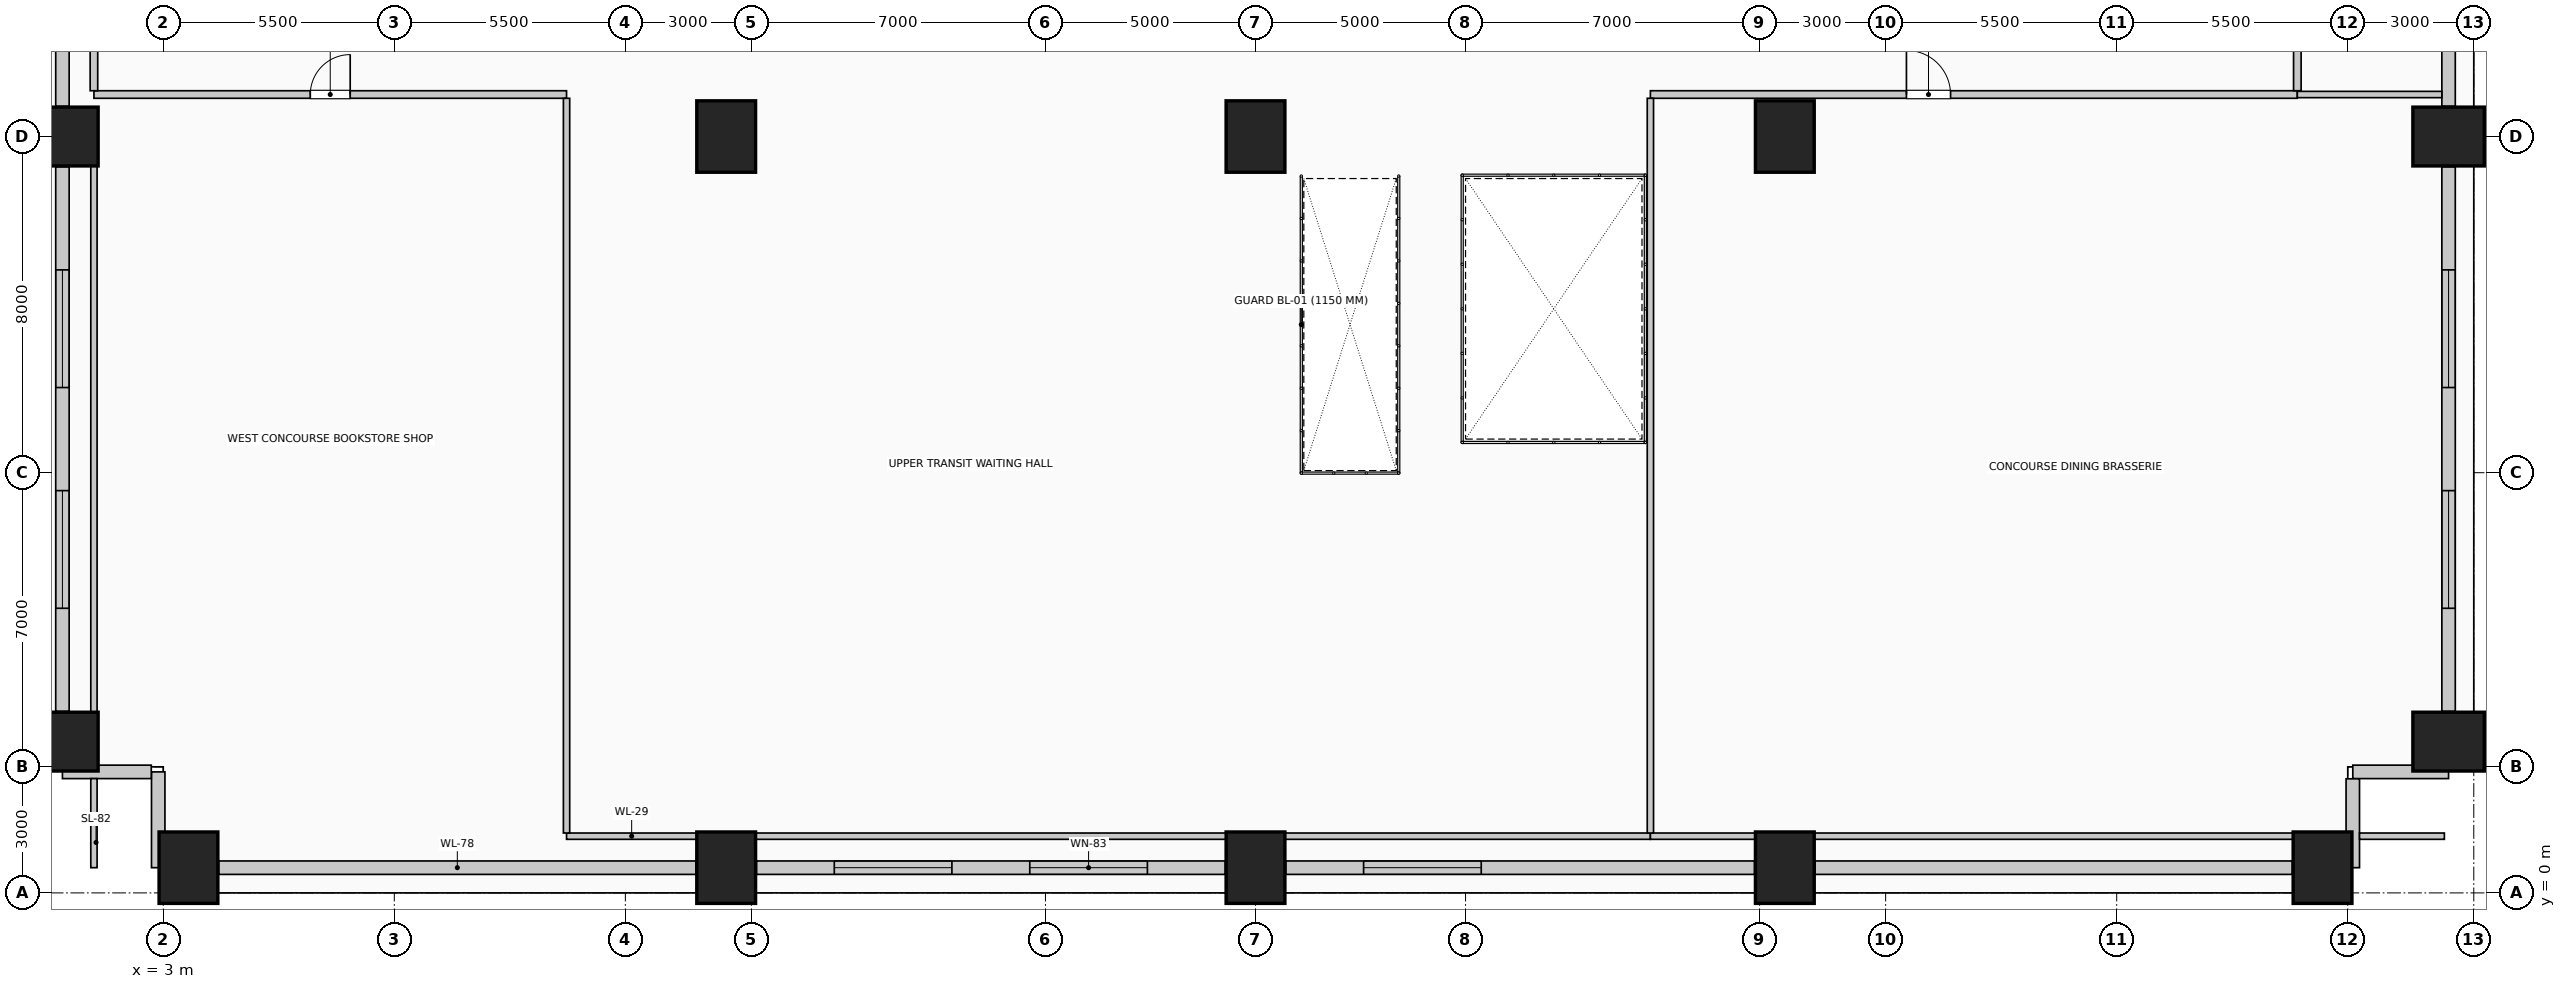
"""IFC4 building model, lengths in metres.
Left out: names, types, materials, properties, quantities, classifications, styles, units other than length and angle.
Written with IfcOpenShell. Run it as: python <this file> out.ifc"""

import sys

from ifc_helpers import new_model, si_unit, direction, frame, frame_2d, origin, origin_2d, place, context, subcontext, project, spatial, rectangle, extrude, element, fill, save


model = new_model("IFC4")
c1 = context("Model", 3, precision=1e-05, world=origin(), true_north=direction((0.0, 1.0)))
c2 = subcontext(c1, "Body", "Model", "MODEL_VIEW")
j1 = project(units=[si_unit("LENGTHUNIT", "METRE"), si_unit("PLANEANGLEUNIT", "RADIAN")], contexts=[c1])
p1 = place(None, origin())
s1 = spatial("IfcSite", under=j1, at=p1, CompositionType="ELEMENT")
p2 = place(p1, origin())
s2 = spatial("IfcBuilding", under=s1, at=p2, CompositionType="ELEMENT")
p3 = place(p2, frame((0.0, 0.0, 13.5)))
s3 = spatial("IfcBuildingStorey", under=s2, at=p3, CompositionType="ELEMENT", Elevation=13.5)
for number, where, z_axis, x_axis in (
    (1, (3.6, 0.6, 0.0), (0.0, 0.0, 1.0), (1.0, 0.0, 0.0)),
    (2, (16.4, 0.6, 0.0), (0.0, 0.0, 1.0), (1.0, 0.0, 0.0)),
    (3, (29.0, 0.6, 0.0), (0.0, 0.0, 1.0), (1.0, 0.0, 0.0)),
    (4, (41.6, 0.6, 0.0), (0.0, 0.0, 1.0), (1.0, 0.0, 0.0)),
    (5, (54.4, 0.6, 0.0), (0.0, 0.0, 1.0), (1.0, 0.0, 0.0)),
    (6, (0.6, 3.6, 0.0), (0.0, 0.0, 1.0), (0.0, 1.0, 0.0)),
    (7, (57.4, 3.6, 0.0), (0.0, 0.0, 1.0), (0.0, 1.0, 0.0)),
    (8, (0.6, 18.0, 0.0), (0.0, 0.0, 1.0), (0.0, 1.0, 0.0)),
    (9, (57.4, 18.0, 0.0), (0.0, 0.0, 1.0), (0.0, 1.0, 0.0)),
    (10, (16.4, 18.0, 0.0), (0.0, 0.0, 1.0), (1.0, 0.0, 0.0)),
    (11, (29.0, 18.0, 0.0), (0.0, 0.0, 1.0), (1.0, 0.0, 0.0)),
    (12, (41.6, 18.0, 0.0), (0.0, 0.0, 1.0), (1.0, 0.0, 0.0)),
):
    element("IfcColumn", number, at=place(p3, frame(where, z_axis=z_axis, x_axis=x_axis)), inside=s3, PredefinedType="COLUMN", context=c2, shape_type="SweptSolid", body=[
        extrude(rectangle(XDim=1.4, YDim=1.7, at=origin_2d()), origin(), (0.0, 0.0, 1.0), 4.05),
    ])
p4 = place(p3, frame((15.68, 0.6, 0.0), z_axis=(0.0, 0.0, 1.0), x_axis=(-1.0, 0.0, 0.0)))
e13 = element("IfcWall", 13, at=p4, inside=s3, PredefinedType="SOLIDWALL", context=c2, shape_type="SweptSolid", body=[
    extrude(rectangle(XDim=11.36, YDim=0.32, at=frame_2d((5.68, 0.0))), origin(), (0.0, 0.0, 1.0), 2.7),
])
p5 = place(p3, frame((28.28, 0.6, 0.0), z_axis=(0.0, 0.0, 1.0), x_axis=(-1.0, 0.0, 0.0)))
e14 = element("IfcWall", 14, at=p5, inside=s3, PredefinedType="SOLIDWALL", context=c2, shape_type="SweptSolid", body=[
    extrude(rectangle(XDim=11.16, YDim=0.32, at=frame_2d((5.58, 0.0))), origin(), (0.0, 0.0, 1.0), 2.7),
])
p6 = place(p5, frame((1.853, 0.0, 0.45)))
e15 = element("IfcOpeningElement", 15, at=p6, cuts=e14, PredefinedType="OPENING", context=c2, shape_type="SweptSolid", body=[
    extrude(rectangle(XDim=2.8, YDim=2.1, at=frame_2d((1.4, 1.05))), frame((0.0, 0.17, 0.0), z_axis=(0.0, -1.0, 0.0), x_axis=(1.0, 0.0, 0.0)), (0.0, 0.0, 1.0), 0.34),
])
p7 = place(p5, frame((6.507, 0.0, 0.45)))
e16 = element("IfcOpeningElement", 16, at=p7, cuts=e14, PredefinedType="OPENING", context=c2, shape_type="SweptSolid", body=[
    extrude(rectangle(XDim=2.8, YDim=2.1, at=frame_2d((1.4, 1.05))), frame((0.0, 0.17, 0.0), z_axis=(0.0, -1.0, 0.0), x_axis=(1.0, 0.0, 0.0)), (0.0, 0.0, 1.0), 0.34),
])
p8 = place(p3, frame((40.88, 0.6, 0.0), z_axis=(0.0, 0.0, 1.0), x_axis=(-1.0, 0.0, 0.0)))
e17 = element("IfcWall", 17, at=p8, inside=s3, PredefinedType="SOLIDWALL", context=c2, shape_type="SweptSolid", body=[
    extrude(rectangle(XDim=11.16, YDim=0.32, at=frame_2d((5.58, 0.0))), origin(), (0.0, 0.0, 1.0), 2.7),
])
p9 = place(p8, frame((6.507, 0.0, 0.45)))
e18 = element("IfcOpeningElement", 18, at=p9, cuts=e17, PredefinedType="OPENING", context=c2, shape_type="SweptSolid", body=[
    extrude(rectangle(XDim=2.8, YDim=2.1, at=frame_2d((1.4, 1.05))), frame((0.0, 0.17, 0.0), z_axis=(0.0, -1.0, 0.0), x_axis=(1.0, 0.0, 0.0)), (0.0, 0.0, 1.0), 0.34),
])
p10 = place(p3, frame((53.68, 0.6, 0.0), z_axis=(0.0, 0.0, 1.0), x_axis=(-1.0, 0.0, 0.0)))
e19 = element("IfcWall", 19, at=p10, inside=s3, PredefinedType="SOLIDWALL", context=c2, shape_type="SweptSolid", body=[
    extrude(rectangle(XDim=11.36, YDim=0.32, at=frame_2d((5.68, 0.0))), origin(), (0.0, 0.0, 1.0), 2.7),
])
p11 = place(p3, frame((0.6, 4.32, 0.0), z_axis=(0.0, 0.0, 1.0), x_axis=(0.0, 1.0, 0.0)))
e20 = element("IfcWall", 20, at=p11, inside=s3, PredefinedType="SOLIDWALL", context=c2, shape_type="SweptSolid", body=[
    extrude(rectangle(XDim=12.96, YDim=0.32, at=frame_2d((6.48, 0.0))), origin(), (0.0, 0.0, 1.0), 2.7),
])
p12 = place(p11, frame((2.453, 0.0, 0.45)))
e21 = element("IfcOpeningElement", 21, at=p12, cuts=e20, PredefinedType="OPENING", context=c2, shape_type="SweptSolid", body=[
    extrude(rectangle(XDim=2.8, YDim=2.1, at=frame_2d((1.4, 1.05))), frame((0.0, 0.17, 0.0), z_axis=(0.0, -1.0, 0.0), x_axis=(1.0, 0.0, 0.0)), (0.0, 0.0, 1.0), 0.34),
])
p13 = place(p11, frame((7.707, 0.0, 0.45)))
e22 = element("IfcOpeningElement", 22, at=p13, cuts=e20, PredefinedType="OPENING", context=c2, shape_type="SweptSolid", body=[
    extrude(rectangle(XDim=2.8, YDim=2.1, at=frame_2d((1.4, 1.05))), frame((0.0, 0.17, 0.0), z_axis=(0.0, -1.0, 0.0), x_axis=(1.0, 0.0, 0.0)), (0.0, 0.0, 1.0), 0.34),
])
p14 = place(p3, frame((0.6, 18.72, 0.0), z_axis=(0.0, 0.0, 1.0), x_axis=(0.0, 1.0, 0.0)))
e23 = element("IfcWall", 23, at=p14, inside=s3, PredefinedType="SOLIDWALL", context=c2, shape_type="SweptSolid", body=[
    extrude(rectangle(XDim=14.56, YDim=0.32, at=frame_2d((7.28, 0.0))), origin(), (0.0, 0.0, 1.0), 2.7),
])
p15 = place(p3, frame((57.4, 17.28, 0.0), z_axis=(0.0, 0.0, 1.0), x_axis=(0.0, -1.0, 0.0)))
e24 = element("IfcWall", 24, at=p15, inside=s3, PredefinedType="SOLIDWALL", context=c2, shape_type="SweptSolid", body=[
    extrude(rectangle(XDim=12.96, YDim=0.32, at=frame_2d((6.48, 0.0))), origin(), (0.0, 0.0, 1.0), 2.7),
])
p16 = place(p15, frame((2.453, 0.0, 0.45)))
e25 = element("IfcOpeningElement", 25, at=p16, cuts=e24, PredefinedType="OPENING", context=c2, shape_type="SweptSolid", body=[
    extrude(rectangle(XDim=2.8, YDim=2.1, at=frame_2d((1.4, 1.05))), frame((0.0, 0.17, 0.0), z_axis=(0.0, -1.0, 0.0), x_axis=(1.0, 0.0, 0.0)), (0.0, 0.0, 1.0), 0.34),
])
p17 = place(p15, frame((7.707, 0.0, 0.45)))
e26 = element("IfcOpeningElement", 26, at=p17, cuts=e24, PredefinedType="OPENING", context=c2, shape_type="SweptSolid", body=[
    extrude(rectangle(XDim=2.8, YDim=2.1, at=frame_2d((1.4, 1.05))), frame((0.0, 0.17, 0.0), z_axis=(0.0, -1.0, 0.0), x_axis=(1.0, 0.0, 0.0)), (0.0, 0.0, 1.0), 0.34),
])
p18 = place(p3, frame((57.4, 33.28, 0.0), z_axis=(0.0, 0.0, 1.0), x_axis=(0.0, -1.0, 0.0)))
e27 = element("IfcWall", 27, at=p18, inside=s3, PredefinedType="SOLIDWALL", context=c2, shape_type="SweptSolid", body=[
    extrude(rectangle(XDim=14.56, YDim=0.32, at=frame_2d((7.28, 0.0))), origin(), (0.0, 0.0, 1.0), 2.7),
])
p19 = place(p3, frame((57.4, 2.88, 0.0), z_axis=(0.0, 0.0, 1.0), x_axis=(-1.0, 0.0, 0.0)))
e28 = element("IfcWall", 28, at=p19, inside=s3, PredefinedType="SOLIDWALL", context=c2, shape_type="SweptSolid", body=[
    extrude(rectangle(XDim=2.28, YDim=0.32, at=frame_2d((1.14, 0.0))), origin(), (0.0, 0.0, 1.0), 3.65),
])
p20 = place(p3, frame((55.12, 2.715, 0.0), z_axis=(0.0, 0.0, 1.0), x_axis=(0.0, -1.0, 0.0)))
e29 = element("IfcWall", 29, at=p20, inside=s3, PredefinedType="SOLIDWALL", context=c2, shape_type="SweptSolid", body=[
    extrude(rectangle(XDim=2.115, YDim=0.32, at=frame_2d((1.058, 0.0))), origin(), (0.0, 0.0, 1.0), 3.65),
])
p21 = place(p3, frame((2.88, 0.6, 0.0), z_axis=(0.0, 0.0, 1.0), x_axis=(0.0, 1.0, 0.0)))
e30 = element("IfcWall", 30, at=p21, inside=s3, PredefinedType="SOLIDWALL", context=c2, shape_type="SweptSolid", body=[
    extrude(rectangle(XDim=2.28, YDim=0.32, at=frame_2d((1.14, 0.0))), origin(), (0.0, 0.0, 1.0), 3.65),
])
p22 = place(p3, frame((2.715, 2.88, 0.0), z_axis=(0.0, 0.0, 1.0), x_axis=(-1.0, 0.0, 0.0)))
e31 = element("IfcWall", 31, at=p22, inside=s3, PredefinedType="SOLIDWALL", context=c2, shape_type="SweptSolid", body=[
    extrude(rectangle(XDim=2.115, YDim=0.32, at=frame_2d((1.058, 0.0))), origin(), (0.0, 0.0, 1.0), 3.65),
])
p23 = place(p3, frame((12.6, 1.35, 0.0), z_axis=(0.0, 0.0, 1.0), x_axis=(1.0, 0.0, 0.0)))
e32 = element("IfcWall", 32, at=p23, inside=s3, PredefinedType="PARTITIONING", context=c2, shape_type="SweptSolid", body=[
    extrude(rectangle(XDim=3.1, YDim=0.15, at=frame_2d((1.55, 0.0))), origin(), (0.0, 0.0, 1.0), 3.65),
])
p24 = place(p3, frame((17.1, 1.35, 0.0), z_axis=(0.0, 0.0, 1.0), x_axis=(1.0, 0.0, 0.0)))
e33 = element("IfcWall", 33, at=p24, inside=s3, PredefinedType="PARTITIONING", context=c2, shape_type="SweptSolid", body=[
    extrude(rectangle(XDim=11.2, YDim=0.15, at=frame_2d((5.6, 0.0))), origin(), (0.0, 0.0, 1.0), 3.65),
])
p25 = place(p3, frame((29.7, 1.35, 0.0), z_axis=(0.0, 0.0, 1.0), x_axis=(1.0, 0.0, 0.0)))
e34 = element("IfcWall", 34, at=p25, inside=s3, PredefinedType="PARTITIONING", context=c2, shape_type="SweptSolid", body=[
    extrude(rectangle(XDim=8.7, YDim=0.15, at=frame_2d((4.35, 0.0))), origin(), (0.0, 0.0, 1.0), 3.65),
])
p26 = place(p3, frame((38.4, 1.35, 0.0), z_axis=(0.0, 0.0, 1.0), x_axis=(1.0, 0.0, 0.0)))
e35 = element("IfcWall", 35, at=p26, inside=s3, PredefinedType="PARTITIONING", context=c2, shape_type="SweptSolid", body=[
    extrude(rectangle(XDim=2.5, YDim=0.15, at=frame_2d((1.25, 0.0))), origin(), (0.0, 0.0, 1.0), 3.65),
])
p27 = place(p3, frame((42.3, 1.35, 0.0), z_axis=(0.0, 0.0, 1.0), x_axis=(1.0, 0.0, 0.0)))
e36 = element("IfcWall", 36, at=p27, inside=s3, PredefinedType="PARTITIONING", context=c2, shape_type="SweptSolid", body=[
    extrude(rectangle(XDim=11.4, YDim=0.15, at=frame_2d((5.7, 0.0))), origin(), (0.0, 0.0, 1.0), 3.65),
])
p28 = place(p3, frame((55.28, 1.35, 0.0), z_axis=(0.0, 0.0, 1.0), x_axis=(1.0, 0.0, 0.0)))
e37 = element("IfcWall", 37, at=p28, inside=s3, PredefinedType="PARTITIONING", context=c2, shape_type="SweptSolid", body=[
    extrude(rectangle(XDim=2.02, YDim=0.15, at=frame_2d((1.01, 0.0))), origin(), (0.0, 0.0, 1.0), 3.65),
])
p29 = place(p3, frame((1.35, 19.0, 0.0), z_axis=(0.0, 0.0, 1.0), x_axis=(1.0, 0.0, 0.0)))
e38 = element("IfcWall", 38, at=p29, inside=s3, PredefinedType="PARTITIONING", context=c2, shape_type="SweptSolid", body=[
    extrude(rectangle(XDim=11.25, YDim=0.18, at=frame_2d((5.625, 0.0))), origin(), (0.0, 0.0, 1.0), 3.65),
])
p30 = place(p29, frame((5.15, 0.0, 0.0)))
e39 = element("IfcOpeningElement", 39, at=p30, cuts=e38, PredefinedType="OPENING", context=c2, shape_type="SweptSolid", body=[
    extrude(rectangle(XDim=0.95, YDim=2.15, at=frame_2d((0.475, 1.075))), frame((0.0, 0.1, 0.0), z_axis=(0.0, -1.0, 0.0), x_axis=(1.0, 0.0, 0.0)), (0.0, 0.0, 1.0), 0.2),
])
p31 = place(p3, frame((38.4, 19.0, 0.0), z_axis=(0.0, 0.0, 1.0), x_axis=(1.0, 0.0, 0.0)))
e40 = element("IfcWall", 40, at=p31, inside=s3, PredefinedType="PARTITIONING", context=c2, shape_type="SweptSolid", body=[
    extrude(rectangle(XDim=15.4, YDim=0.18, at=frame_2d((7.7, 0.0))), origin(), (0.0, 0.0, 1.0), 3.65),
])
p32 = place(p31, frame((6.095, 0.0, 0.0)))
e41 = element("IfcOpeningElement", 41, at=p32, cuts=e40, PredefinedType="OPENING", context=c2, shape_type="SweptSolid", body=[
    extrude(rectangle(XDim=1.05, YDim=2.15, at=frame_2d((0.525, 1.075))), frame((0.0, 0.1, 0.0), z_axis=(0.0, -1.0, 0.0), x_axis=(1.0, 0.0, 0.0)), (0.0, 0.0, 1.0), 0.2),
])
p33 = place(p3, frame((53.8, 19.0, 0.0), z_axis=(0.0, 0.0, 1.0), x_axis=(1.0, 0.0, 0.0)))
e42 = element("IfcWall", 42, at=p33, inside=s3, PredefinedType="PARTITIONING", context=c2, shape_type="SweptSolid", body=[
    extrude(rectangle(XDim=3.44, YDim=0.15, at=frame_2d((1.72, 0.0))), origin(), (0.0, 0.0, 1.0), 3.65),
])
p34 = place(p3, frame((1.35, 0.6, 0.0), z_axis=(0.0, 0.0, 1.0), x_axis=(0.0, 1.0, 0.0)))
e43 = element("IfcWall", 43, at=p34, inside=s3, PredefinedType="PARTITIONING", context=c2, shape_type="SweptSolid", body=[
    extrude(rectangle(XDim=2.12, YDim=0.15, at=frame_2d((1.06, 0.0))), origin(), (0.0, 0.0, 1.0), 3.65),
])
p35 = place(p3, frame((1.35, 4.3, 0.0), z_axis=(0.0, 0.0, 1.0), x_axis=(0.0, 1.0, 0.0)))
e44 = element("IfcWall", 44, at=p35, inside=s3, PredefinedType="PARTITIONING", context=c2, shape_type="SweptSolid", body=[
    extrude(rectangle(XDim=13.0, YDim=0.15, at=frame_2d((6.5, 0.0))), origin(), (0.0, 0.0, 1.0), 3.65),
])
p36 = place(p3, frame((1.35, 19.09, 0.0), z_axis=(0.0, 0.0, 1.0), x_axis=(0.0, 1.0, 0.0)))
e45 = element("IfcWall", 45, at=p36, inside=s3, PredefinedType="PARTITIONING", context=c2, shape_type="SweptSolid", body=[
    extrude(rectangle(XDim=1.11, YDim=0.18, at=frame_2d((0.555, 0.0))), origin(), (0.0, 0.0, 1.0), 3.65),
])
for number, where, z_axis, x_axis in (
    (46, (12.6, 1.425, 0.0), (0.0, 0.0, 1.0), (0.0, 1.0, 0.0)),
    (47, (38.4, 1.425, 0.0), (0.0, 0.0, 1.0), (0.0, 1.0, 0.0)),
):
    element("IfcWall", number, at=place(p3, frame(where, z_axis=z_axis, x_axis=x_axis)), inside=s3, PredefinedType="PARTITIONING", context=c2, shape_type="SweptSolid", body=[
        extrude(rectangle(XDim=17.485, YDim=0.15, at=frame_2d((8.742, 0.0))), origin(), (0.0, 0.0, 1.0), 3.65),
    ])
p37 = place(p3, frame((53.8, 19.09, 0.0), z_axis=(0.0, 0.0, 1.0), x_axis=(0.0, 1.0, 0.0)))
e48 = element("IfcWall", 48, at=p37, inside=s3, PredefinedType="PARTITIONING", context=c2, shape_type="SweptSolid", body=[
    extrude(rectangle(XDim=1.02, YDim=0.18, at=frame_2d((0.51, 0.0))), origin(), (0.0, 0.0, 1.0), 3.65),
])
p38 = place(p6, origin())
e49 = element("IfcWindow", 49, at=p38, inside=s3, PartitioningType="SINGLE_PANEL", PredefinedType="WINDOW", context=c2, shape_type="SweptSolid", body=[
    extrude(rectangle(XDim=2.8, YDim=2.1, at=frame_2d((1.4, 1.05))), frame((0.0, 0.03, 0.0), z_axis=(0.0, -1.0, 0.0), x_axis=(1.0, 0.0, 0.0)), (0.0, 0.0, 1.0), 0.06),
])
fill(e15, e49)
p39 = place(p7, origin())
e50 = element("IfcWindow", 50, at=p39, inside=s3, PartitioningType="SINGLE_PANEL", PredefinedType="WINDOW", context=c2, shape_type="SweptSolid", body=[
    extrude(rectangle(XDim=2.8, YDim=2.1, at=frame_2d((1.4, 1.05))), frame((0.0, 0.03, 0.0), z_axis=(0.0, -1.0, 0.0), x_axis=(1.0, 0.0, 0.0)), (0.0, 0.0, 1.0), 0.06),
])
fill(e16, e50)
p40 = place(p9, origin())
e51 = element("IfcWindow", 51, at=p40, inside=s3, PartitioningType="SINGLE_PANEL", PredefinedType="WINDOW", context=c2, shape_type="SweptSolid", body=[
    extrude(rectangle(XDim=2.8, YDim=2.1, at=frame_2d((1.4, 1.05))), frame((0.0, 0.03, 0.0), z_axis=(0.0, -1.0, 0.0), x_axis=(1.0, 0.0, 0.0)), (0.0, 0.0, 1.0), 0.06),
])
fill(e18, e51)
p41 = place(p12, origin())
e52 = element("IfcWindow", 52, at=p41, inside=s3, PartitioningType="SINGLE_PANEL", PredefinedType="WINDOW", context=c2, shape_type="SweptSolid", body=[
    extrude(rectangle(XDim=2.8, YDim=2.1, at=frame_2d((1.4, 1.05))), frame((0.0, 0.03, 0.0), z_axis=(0.0, -1.0, 0.0), x_axis=(1.0, 0.0, 0.0)), (0.0, 0.0, 1.0), 0.06),
])
fill(e21, e52)
p42 = place(p13, origin())
e53 = element("IfcWindow", 53, at=p42, inside=s3, PartitioningType="SINGLE_PANEL", PredefinedType="WINDOW", context=c2, shape_type="SweptSolid", body=[
    extrude(rectangle(XDim=2.8, YDim=2.1, at=frame_2d((1.4, 1.05))), frame((0.0, 0.03, 0.0), z_axis=(0.0, -1.0, 0.0), x_axis=(1.0, 0.0, 0.0)), (0.0, 0.0, 1.0), 0.06),
])
fill(e22, e53)
p43 = place(p16, origin())
e54 = element("IfcWindow", 54, at=p43, inside=s3, PartitioningType="SINGLE_PANEL", PredefinedType="WINDOW", context=c2, shape_type="SweptSolid", body=[
    extrude(rectangle(XDim=2.8, YDim=2.1, at=frame_2d((1.4, 1.05))), frame((0.0, 0.03, 0.0), z_axis=(0.0, -1.0, 0.0), x_axis=(1.0, 0.0, 0.0)), (0.0, 0.0, 1.0), 0.06),
])
fill(e25, e54)
p44 = place(p17, origin())
e55 = element("IfcWindow", 55, at=p44, inside=s3, PartitioningType="SINGLE_PANEL", PredefinedType="WINDOW", context=c2, shape_type="SweptSolid", body=[
    extrude(rectangle(XDim=2.8, YDim=2.1, at=frame_2d((1.4, 1.05))), frame((0.0, 0.03, 0.0), z_axis=(0.0, -1.0, 0.0), x_axis=(1.0, 0.0, 0.0)), (0.0, 0.0, 1.0), 0.06),
])
fill(e26, e55)
p45 = place(p30, origin())
e56 = element("IfcDoor", 56, at=p45, inside=s3, OperationType="SINGLE_SWING_RIGHT", PredefinedType="DOOR", context=c2, shape_type="SweptSolid", body=[
    extrude(rectangle(XDim=0.95, YDim=2.15, at=frame_2d((0.475, 1.075))), frame((0.0, 0.025, 0.0), z_axis=(0.0, -1.0, 0.0), x_axis=(1.0, 0.0, 0.0)), (0.0, 0.0, 1.0), 0.05),
])
fill(e39, e56)
p46 = place(p32, origin())
e57 = element("IfcDoor", 57, at=p46, inside=s3, OperationType="SINGLE_SWING_LEFT", PredefinedType="DOOR", context=c2, shape_type="SweptSolid", body=[
    extrude(rectangle(XDim=1.05, YDim=2.15, at=frame_2d((0.525, 1.075))), frame((0.0, 0.025, 0.0), z_axis=(0.0, -1.0, 0.0), x_axis=(1.0, 0.0, 0.0)), (0.0, 0.0, 1.0), 0.05),
])
fill(e41, e57)
save(model, sys.argv[1])
